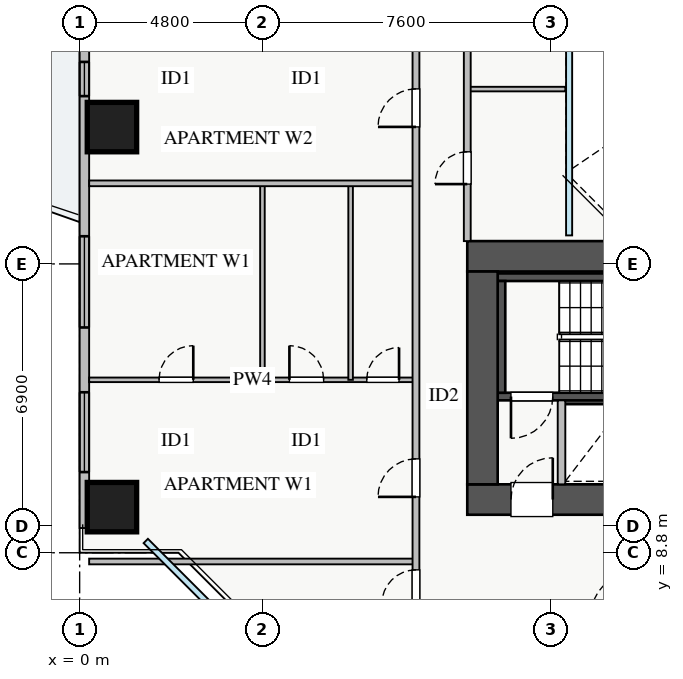
"""IFC4 building model, lengths in metres.
Left out: names, types, materials, properties, quantities, classifications, styles, units other than length and angle.
Written with IfcOpenShell. Run it as: python <this file> out.ifc"""

import sys

from ifc_helpers import new_model, si_unit, direction, frame, frame_2d, origin, origin_2d, place, context, subcontext, project, spatial, rectangle, extrude, source, transform, mapped, element, fill, save


model = new_model("IFC4")
c1 = context("Model", 3, precision=1e-05, world=origin(), true_north=direction((0.0, 1.0)))
c2 = subcontext(c1, "Body", "Model", "MODEL_VIEW")
j1 = project(units=[si_unit("LENGTHUNIT", "METRE"), si_unit("PLANEANGLEUNIT", "RADIAN")], contexts=[c1])
p1 = place(None, origin())
s1 = spatial("IfcSite", under=j1, at=p1, CompositionType="ELEMENT")
p2 = place(p1, origin())
s2 = spatial("IfcBuilding", under=s1, at=p2, CompositionType="ELEMENT")
p3 = place(p2, frame((0.0, 0.0, 36.0)))
s3 = spatial("IfcBuildingStorey", under=s2, at=p3, CompositionType="ELEMENT", Elevation=36.0)
p4 = place(p3, frame((12.68, 12.8, 0.0), z_axis=(0.0, 0.0, 1.0), x_axis=(1.0, 0.0, 0.0)))
e1 = element("IfcWall", 1, at=p4, inside=s3, PredefinedType="SHEAR", context=c2, shape_type="SweptSolid", body=[
    extrude(rectangle(XDim=1.94, YDim=0.18, at=frame_2d((0.97, 0.0))), origin(), (0.0, 0.0, 1.0), 3.07),
])
p5 = place(p3, frame((11.0, 12.91, 0.0), z_axis=(0.0, 0.0, 1.0), x_axis=(1.0, 0.0, 0.0)))
e2 = element("IfcWall", 2, at=p5, inside=s3, PredefinedType="SHEAR", context=c2, shape_type="SweptSolid", body=[
    extrude(rectangle(XDim=7.15, YDim=0.2, at=frame_2d((3.575, 0.0))), origin(), (0.0, 0.0, 1.0), 3.25),
])
p6 = place(p5, frame((0.35, 0.0, 0.0)))
e3 = element("IfcOpeningElement", 3, at=p6, cuts=e2, PredefinedType="OPENING", context=c2, shape_type="SweptSolid", body=[
    extrude(rectangle(XDim=1.1, YDim=2.05, at=frame_2d((0.55, 1.025))), frame((0.0, 0.11, 0.0), z_axis=(0.0, -1.0, 0.0), x_axis=(1.0, 0.0, 0.0)), (0.0, 0.0, 1.0), 0.22),
])
p7 = place(p3, frame((11.0, 16.05, 0.0), z_axis=(0.0, 0.0, 1.0), x_axis=(1.0, 0.0, 0.0)))
e4 = element("IfcWall", 4, at=p7, inside=s3, PredefinedType="SHEAR", context=c2, shape_type="SweptSolid", body=[
    extrude(rectangle(XDim=7.15, YDim=0.2, at=frame_2d((3.575, 0.0))), origin(), (0.0, 0.0, 1.0), 3.25),
])
p8 = place(p3, frame((11.1, 13.01, 0.0), z_axis=(0.0, 0.0, 1.0), x_axis=(0.0, 1.0, 0.0)))
e5 = element("IfcWall", 5, at=p8, inside=s3, PredefinedType="SHEAR", context=c2, shape_type="SweptSolid", body=[
    extrude(rectangle(XDim=2.94, YDim=0.2, at=frame_2d((1.47, 0.0))), origin(), (0.0, 0.0, 1.0), 3.25),
])
p9 = place(p3, frame((10.2, 10.2, 0.0), z_axis=(0.0, 0.0, 1.0), x_axis=(1.0, 0.0, 0.0)))
e6 = element("IfcWall", 6, at=p9, inside=s3, PredefinedType="SHEAR", context=c2, shape_type="SweptSolid", body=[
    extrude(rectangle(XDim=17.6, YDim=0.8, at=frame_2d((8.8, 0.0))), origin(), (0.0, 0.0, 1.0), 3.25),
])
p10 = place(p9, frame((1.15, 0.0, 0.0)))
e7 = element("IfcOpeningElement", 7, at=p10, cuts=e6, PredefinedType="OPENING", context=c2, shape_type="SweptSolid", body=[
    extrude(rectangle(XDim=1.1, YDim=2.05, at=frame_2d((0.55, 1.025))), frame((0.0, 0.41, 0.0), z_axis=(0.0, -1.0, 0.0), x_axis=(1.0, 0.0, 0.0)), (0.0, 0.0, 1.0), 0.82),
])
p11 = place(p9, frame((8.3, 0.0, 0.0)))
e8 = element("IfcOpeningElement", 8, at=p11, cuts=e6, PredefinedType="OPENING", context=c2, shape_type="SweptSolid", body=[
    extrude(rectangle(XDim=1.1, YDim=2.05, at=frame_2d((0.55, 1.025))), frame((0.0, 0.41, 0.0), z_axis=(0.0, -1.0, 0.0), x_axis=(1.0, 0.0, 0.0)), (0.0, 0.0, 1.0), 0.82),
])
p12 = place(p9, frame((10.05, 0.0, 0.0)))
e9 = element("IfcOpeningElement", 9, at=p12, cuts=e6, PredefinedType="OPENING", context=c2, shape_type="SweptSolid", body=[
    extrude(rectangle(XDim=1.1, YDim=2.05, at=frame_2d((0.55, 1.025))), frame((0.0, 0.41, 0.0), z_axis=(0.0, -1.0, 0.0), x_axis=(1.0, 0.0, 0.0)), (0.0, 0.0, 1.0), 0.82),
])
p13 = place(p9, frame((14.74, 0.0, 0.0)))
e10 = element("IfcOpeningElement", 10, at=p13, cuts=e6, PredefinedType="OPENING", context=c2, shape_type="SweptSolid", body=[
    extrude(rectangle(XDim=1.0, YDim=2.05, at=frame_2d((0.5, 1.025))), frame((0.0, 0.41, 0.0), z_axis=(0.0, -1.0, 0.0), x_axis=(1.0, 0.0, 0.0)), (0.0, 0.0, 1.0), 0.82),
])
p14 = place(p9, frame((11.945, 0.0, 0.0)))
e11 = element("IfcOpeningElement", 11, at=p14, cuts=e6, PredefinedType="OPENING", context=c2, shape_type="SweptSolid", body=[
    extrude(rectangle(XDim=1.0, YDim=2.05, at=frame_2d((0.5, 1.025))), frame((0.0, 0.41, 0.0), z_axis=(0.0, -1.0, 0.0), x_axis=(1.0, 0.0, 0.0)), (0.0, 0.0, 1.0), 0.82),
])
p15 = place(p9, frame((13.48, 0.0, 0.0)))
e12 = element("IfcOpeningElement", 12, at=p15, cuts=e6, PredefinedType="OPENING", context=c2, shape_type="SweptSolid", body=[
    extrude(rectangle(XDim=1.0, YDim=2.05, at=frame_2d((0.5, 1.025))), frame((0.0, 0.41, 0.0), z_axis=(0.0, -1.0, 0.0), x_axis=(1.0, 0.0, 0.0)), (0.0, 0.0, 1.0), 0.82),
])
p16 = place(p3, frame((10.2, 16.6, 0.0), z_axis=(0.0, 0.0, 1.0), x_axis=(1.0, 0.0, 0.0)))
e13 = element("IfcWall", 13, at=p16, inside=s3, PredefinedType="SHEAR", context=c2, shape_type="SweptSolid", body=[
    extrude(rectangle(XDim=17.6, YDim=0.8, at=frame_2d((8.8, 0.0))), origin(), (0.0, 0.0, 1.0), 3.25),
])
p17 = place(p3, frame((10.6, 10.6, 0.0), z_axis=(0.0, 0.0, 1.0), x_axis=(0.0, 1.0, 0.0)))
e14 = element("IfcWall", 14, at=p17, inside=s3, PredefinedType="SHEAR", context=c2, shape_type="SweptSolid", body=[
    extrude(rectangle(XDim=5.6, YDim=0.8, at=frame_2d((2.8, 0.0))), origin(), (0.0, 0.0, 1.0), 3.25),
])
m1 = source(origin(), c2, "Body", "SweptSolid", [
    extrude(rectangle(XDim=1.3, YDim=1.3, at=origin_2d()), origin(), (0.0, 0.0, 1.0), 3.25),
])
for number, where, z_axis, x_axis in (
    (15, (0.85, 20.0, 0.0), (0.0, 0.0, 1.0), (1.0, 0.0, 0.0)),
    (16, (0.85, 10.0, 0.0), (0.0, 0.0, 1.0), (1.0, 0.0, 0.0)),
):
    element("IfcColumn", number, at=place(p3, frame(where, z_axis=z_axis, x_axis=x_axis)), inside=s3, PredefinedType="COLUMN", context=c2, shape_type="MappedRepresentation", body=[
        mapped(m1, transform((0.0, 0.0, 0.0), x_axis=(1.0, 0.0, 0.0), y_axis=(0.0, 1.0, 0.0), z_axis=(0.0, 0.0, 1.0), scale=1.0)),
    ])
p18 = place(p3, frame((0.125, 9.45, 0.0), z_axis=(0.0, 0.0, 1.0), x_axis=(0.0, 1.0, 0.0)))
e17 = element("IfcWall", 17, at=p18, inside=s3, PredefinedType="STANDARD", context=c2, shape_type="SweptSolid", body=[
    extrude(rectangle(XDim=27.1, YDim=0.25, at=frame_2d((13.55, 0.0))), origin(), (0.0, 0.0, 1.0), 2.61),
])
p19 = place(p18, frame((14.4, 0.0, 0.0)))
e18 = element("IfcOpeningElement", 18, at=p19, cuts=e17, PredefinedType="OPENING", context=c2, shape_type="SweptSolid", body=[
    extrude(rectangle(XDim=1.2, YDim=2.1, at=frame_2d((0.6, 1.05))), frame((0.0, 0.135, 0.0), z_axis=(0.0, -1.0, 0.0), x_axis=(1.0, 0.0, 0.0)), (0.0, 0.0, 1.0), 0.27),
])
p20 = place(p18, frame((1.472, 0.0, 0.9)))
e19 = element("IfcOpeningElement", 19, at=p20, cuts=e17, PredefinedType="OPENING", context=c2, shape_type="SweptSolid", body=[
    extrude(rectangle(XDim=2.1, YDim=1.5, at=frame_2d((1.05, 0.75))), frame((0.0, 0.135, 0.0), z_axis=(0.0, -1.0, 0.0), x_axis=(1.0, 0.0, 0.0)), (0.0, 0.0, 1.0), 0.27),
])
p21 = place(p18, frame((22.663, 0.0, 0.9)))
e20 = element("IfcOpeningElement", 20, at=p21, cuts=e17, PredefinedType="OPENING", context=c2, shape_type="SweptSolid", body=[
    extrude(rectangle(XDim=2.1, YDim=1.48, at=frame_2d((1.05, 0.74))), frame((0.0, 0.135, 0.0), z_axis=(0.0, -1.0, 0.0), x_axis=(1.0, 0.0, 0.0)), (0.0, 0.0, 1.0), 0.27),
])
p22 = place(p18, frame((5.278, 0.0, 0.9)))
e21 = element("IfcOpeningElement", 21, at=p22, cuts=e17, PredefinedType="OPENING", context=c2, shape_type="SweptSolid", body=[
    extrude(rectangle(XDim=2.4, YDim=1.5, at=frame_2d((1.2, 0.75))), frame((0.0, 0.135, 0.0), z_axis=(0.0, -1.0, 0.0), x_axis=(1.0, 0.0, 0.0)), (0.0, 0.0, 1.0), 0.27),
])
p23 = place(p18, frame((11.365, 0.0, 0.9)))
e22 = element("IfcOpeningElement", 22, at=p23, cuts=e17, PredefinedType="OPENING", context=c2, shape_type="SweptSolid", body=[
    extrude(rectangle(XDim=0.9, YDim=1.2, at=frame_2d((0.45, 0.6))), frame((0.0, 0.135, 0.0), z_axis=(0.0, -1.0, 0.0), x_axis=(1.0, 0.0, 0.0)), (0.0, 0.0, 1.0), 0.27),
])
p24 = place(p3, frame((12.68, 10.6, 0.0), z_axis=(0.0, 0.0, 1.0), x_axis=(0.0, 1.0, 0.0)))
e23 = element("IfcWall", 23, at=p24, inside=s3, PredefinedType="PARTITIONING", context=c2, shape_type="SweptSolid", body=[
    extrude(rectangle(XDim=2.21, YDim=0.2, at=frame_2d((1.105, 0.0))), origin(), (0.0, 0.0, 1.0), 3.07),
])
p25 = place(p3, frame((0.25, 8.57, 0.0), z_axis=(0.0, 0.0, 1.0), x_axis=(1.0, 0.0, 0.0)))
e24 = element("IfcWall", 24, at=p25, inside=s3, PredefinedType="PARTITIONING", context=c2, shape_type="SweptSolid", body=[
    extrude(rectangle(XDim=8.6, YDim=0.15, at=frame_2d((4.3, 0.0))), origin(), (0.0, 0.0, 1.0), 3.07),
])
p26 = place(p3, frame((0.25, 13.35, 0.0), z_axis=(0.0, 0.0, 1.0), x_axis=(1.0, 0.0, 0.0)))
e25 = element("IfcWall", 25, at=p26, inside=s3, PredefinedType="PLUMBINGWALL", context=c2, shape_type="SweptSolid", body=[
    extrude(rectangle(XDim=8.6, YDim=0.12, at=frame_2d((4.3, 0.0))), origin(), (0.0, 0.0, 1.0), 3.07),
])
p27 = place(p26, frame((1.84, 0.0, 0.0)))
e26 = element("IfcOpeningElement", 26, at=p27, cuts=e25, PredefinedType="OPENING", context=c2, shape_type="SweptSolid", body=[
    extrude(rectangle(XDim=0.9, YDim=2.05, at=frame_2d((0.45, 1.025))), frame((0.0, 0.07, 0.0), z_axis=(0.0, -1.0, 0.0), x_axis=(1.0, 0.0, 0.0)), (0.0, 0.0, 1.0), 0.14),
])
p28 = place(p26, frame((5.27, 0.0, 0.0)))
e27 = element("IfcOpeningElement", 27, at=p28, cuts=e25, PredefinedType="OPENING", context=c2, shape_type="SweptSolid", body=[
    extrude(rectangle(XDim=0.9, YDim=2.05, at=frame_2d((0.45, 1.025))), frame((0.0, 0.07, 0.0), z_axis=(0.0, -1.0, 0.0), x_axis=(1.0, 0.0, 0.0)), (0.0, 0.0, 1.0), 0.14),
])
p29 = place(p26, frame((7.305, 0.0, 0.0)))
e28 = element("IfcOpeningElement", 28, at=p29, cuts=e25, PredefinedType="OPENING", context=c2, shape_type="SweptSolid", body=[
    extrude(rectangle(XDim=0.85, YDim=2.05, at=frame_2d((0.425, 1.025))), frame((0.0, 0.07, 0.0), z_axis=(0.0, -1.0, 0.0), x_axis=(1.0, 0.0, 0.0)), (0.0, 0.0, 1.0), 0.14),
])
for number, where, z_axis, x_axis in (
    (29, (4.81, 13.35, 0.0), (0.0, 0.0, 1.0), (0.0, 1.0, 0.0)),
    (30, (7.13, 13.35, 0.0), (0.0, 0.0, 1.0), (0.0, 1.0, 0.0)),
):
    element("IfcWall", number, at=place(p3, frame(where, z_axis=z_axis, x_axis=x_axis)), inside=s3, PredefinedType="PLUMBINGWALL", context=c2, shape_type="SweptSolid", body=[
        extrude(rectangle(XDim=5.17, YDim=0.12, at=frame_2d((2.585, 0.0))), origin(), (0.0, 0.0, 1.0), 3.07),
    ])
p30 = place(p3, frame((0.25, 18.52, 0.0), z_axis=(0.0, 0.0, 1.0), x_axis=(1.0, 0.0, 0.0)))
e31 = element("IfcWall", 31, at=p30, inside=s3, PredefinedType="PARTITIONING", context=c2, shape_type="SweptSolid", body=[
    extrude(rectangle(XDim=8.6, YDim=0.15, at=frame_2d((4.3, 0.0))), origin(), (0.0, 0.0, 1.0), 3.07),
])
p31 = place(p3, frame((8.85, 7.21, 0.0), z_axis=(0.0, 0.0, 1.0), x_axis=(0.0, 1.0, 0.0)))
e32 = element("IfcWall", 32, at=p31, inside=s3, PredefinedType="PARTITIONING", context=c2, shape_type="SweptSolid", body=[
    extrude(rectangle(XDim=31.23, YDim=0.18, at=frame_2d((15.615, 0.0))), origin(), (0.0, 0.0, 1.0), 3.07),
])
p32 = place(p31, frame((30.09, 0.0, 0.0)))
e33 = element("IfcOpeningElement", 33, at=p32, cuts=e32, PredefinedType="OPENING", context=c2, shape_type="SweptSolid", body=[
    extrude(rectangle(XDim=0.9, YDim=2.05, at=frame_2d((0.45, 1.025))), frame((0.0, 0.1, 0.0), z_axis=(0.0, -1.0, 0.0), x_axis=(1.0, 0.0, 0.0)), (0.0, 0.0, 1.0), 0.2),
])
p33 = place(p31, frame((0.24, 0.0, 0.0)))
e34 = element("IfcOpeningElement", 34, at=p33, cuts=e32, PredefinedType="OPENING", context=c2, shape_type="SweptSolid", body=[
    extrude(rectangle(XDim=0.9, YDim=2.05, at=frame_2d((0.45, 1.025))), frame((0.0, 0.1, 0.0), z_axis=(0.0, -1.0, 0.0), x_axis=(1.0, 0.0, 0.0)), (0.0, 0.0, 1.0), 0.2),
])
p34 = place(p31, frame((3.06, 0.0, 0.0)))
e35 = element("IfcOpeningElement", 35, at=p34, cuts=e32, PredefinedType="OPENING", context=c2, shape_type="SweptSolid", body=[
    extrude(rectangle(XDim=1.0, YDim=2.05, at=frame_2d((0.5, 1.025))), frame((0.0, 0.1, 0.0), z_axis=(0.0, -1.0, 0.0), x_axis=(1.0, 0.0, 0.0)), (0.0, 0.0, 1.0), 0.2),
])
p35 = place(p31, frame((12.795, 0.0, 0.0)))
e36 = element("IfcOpeningElement", 36, at=p35, cuts=e32, PredefinedType="OPENING", context=c2, shape_type="SweptSolid", body=[
    extrude(rectangle(XDim=1.0, YDim=2.05, at=frame_2d((0.5, 1.025))), frame((0.0, 0.1, 0.0), z_axis=(0.0, -1.0, 0.0), x_axis=(1.0, 0.0, 0.0)), (0.0, 0.0, 1.0), 0.2),
])
p36 = place(p31, frame((24.62, 0.0, 0.0)))
e37 = element("IfcOpeningElement", 37, at=p36, cuts=e32, PredefinedType="OPENING", context=c2, shape_type="SweptSolid", body=[
    extrude(rectangle(XDim=1.0, YDim=2.05, at=frame_2d((0.5, 1.025))), frame((0.0, 0.1, 0.0), z_axis=(0.0, -1.0, 0.0), x_axis=(1.0, 0.0, 0.0)), (0.0, 0.0, 1.0), 0.2),
])
p37 = place(p3, frame((10.2, 21.0, 0.0), z_axis=(0.0, 0.0, 1.0), x_axis=(1.0, 0.0, 0.0)))
e38 = element("IfcWall", 38, at=p37, inside=s3, PredefinedType="PLUMBINGWALL", context=c2, shape_type="SweptSolid", body=[
    extrude(rectangle(XDim=2.58, YDim=0.12, at=frame_2d((1.29, 0.0))), origin(), (0.0, 0.0, 1.0), 3.07),
])
p38 = place(p3, frame((10.2, 17.0, 0.0), z_axis=(0.0, 0.0, 1.0), x_axis=(0.0, 1.0, 0.0)))
e39 = element("IfcWall", 39, at=p38, inside=s3, PredefinedType="PARTITIONING", context=c2, shape_type="SweptSolid", body=[
    extrude(rectangle(XDim=12.0, YDim=0.18, at=frame_2d((6.0, 0.0))), origin(), (0.0, 0.0, 1.0), 3.07),
])
p39 = place(p38, frame((1.5, 0.0, 0.0)))
e40 = element("IfcOpeningElement", 40, at=p39, cuts=e39, PredefinedType="OPENING", context=c2, shape_type="SweptSolid", body=[
    extrude(rectangle(XDim=0.85, YDim=2.05, at=frame_2d((0.425, 1.025))), frame((0.0, 0.1, 0.0), z_axis=(0.0, -1.0, 0.0), x_axis=(1.0, 0.0, 0.0)), (0.0, 0.0, 1.0), 0.2),
])
p40 = place(p38, frame((6.5, 0.0, 0.0)))
e41 = element("IfcOpeningElement", 41, at=p40, cuts=e39, PredefinedType="OPENING", context=c2, shape_type="SweptSolid", body=[
    extrude(rectangle(XDim=1.0, YDim=2.05, at=frame_2d((0.5, 1.025))), frame((0.0, 0.1, 0.0), z_axis=(0.0, -1.0, 0.0), x_axis=(1.0, 0.0, 0.0)), (0.0, 0.0, 1.0), 0.2),
])
m2 = source(origin(), c2, "Body", "SweptSolid", [
    extrude(rectangle(XDim=2.1, YDim=1.5, at=frame_2d((1.05, 0.75))), frame((0.0, 0.03, 0.0), z_axis=(0.0, -1.0, 0.0), x_axis=(1.0, 0.0, 0.0)), (0.0, 0.0, 1.0), 0.06),
])
p41 = place(p20, origin())
e42 = element("IfcWindow", 42, at=p41, inside=s3, PartitioningType="TRIPLE_PANEL_VERTICAL", PredefinedType="WINDOW", context=c2, shape_type="MappedRepresentation", body=[
    mapped(m2, transform((0.0, 0.0, 0.0), x_axis=(1.0, 0.0, 0.0), y_axis=(0.0, 1.0, 0.0), z_axis=(0.0, 0.0, 1.0), scale=1.0)),
])
fill(e19, e42)
m3 = source(origin(), c2, "Body", "SweptSolid", [
    extrude(rectangle(XDim=1.1, YDim=2.05, at=frame_2d((0.55, 1.025))), frame((0.0, 0.025, 0.0), z_axis=(0.0, -1.0, 0.0), x_axis=(1.0, 0.0, 0.0)), (0.0, 0.0, 1.0), 0.05),
])
p42 = place(p10, origin())
e43 = element("IfcDoor", 43, at=p42, inside=s3, OperationType="SINGLE_SWING_RIGHT", PredefinedType="DOOR", context=c2, shape_type="MappedRepresentation", body=[
    mapped(m3, transform((0.0, 0.0, 0.0), x_axis=(1.0, 0.0, 0.0), y_axis=(0.0, 1.0, 0.0), z_axis=(0.0, 0.0, 1.0), scale=1.0)),
])
fill(e7, e43)
p43 = place(p6, frame((1.1, 0.0, 0.0), z_axis=(0.0, 0.0, 1.0), x_axis=(-1.0, 0.0, 0.0)))
e44 = element("IfcDoor", 44, at=p43, inside=s3, OperationType="SINGLE_SWING_LEFT", PredefinedType="DOOR", context=c2, shape_type="MappedRepresentation", body=[
    mapped(m3, transform((0.0, 0.0, 0.0), x_axis=(1.0, 0.0, 0.0), y_axis=(0.0, 1.0, 0.0), z_axis=(0.0, 0.0, 1.0), scale=1.0)),
])
fill(e3, e44)
m4 = source(origin(), c2, "Body", "SweptSolid", [
    extrude(rectangle(XDim=0.9, YDim=2.05, at=frame_2d((0.45, 1.025))), frame((0.0, 0.025, 0.0), z_axis=(0.0, -1.0, 0.0), x_axis=(1.0, 0.0, 0.0)), (0.0, 0.0, 1.0), 0.05),
])
p44 = place(p27, origin())
e45 = element("IfcDoor", 45, at=p44, inside=s3, OperationType="SINGLE_SWING_RIGHT", PredefinedType="DOOR", context=c2, shape_type="MappedRepresentation", body=[
    mapped(m4, transform((0.0, 0.0, 0.0), x_axis=(1.0, 0.0, 0.0), y_axis=(0.0, 1.0, 0.0), z_axis=(0.0, 0.0, 1.0), scale=1.0)),
])
fill(e26, e45)
p45 = place(p28, origin())
e46 = element("IfcDoor", 46, at=p45, inside=s3, OperationType="SINGLE_SWING_LEFT", PredefinedType="DOOR", context=c2, shape_type="MappedRepresentation", body=[
    mapped(m4, transform((0.0, 0.0, 0.0), x_axis=(1.0, 0.0, 0.0), y_axis=(0.0, 1.0, 0.0), z_axis=(0.0, 0.0, 1.0), scale=1.0)),
])
fill(e27, e46)
m5 = source(origin(), c2, "Body", "SweptSolid", [
    extrude(rectangle(XDim=0.85, YDim=2.05, at=frame_2d((0.425, 1.025))), frame((0.0, 0.025, 0.0), z_axis=(0.0, -1.0, 0.0), x_axis=(1.0, 0.0, 0.0)), (0.0, 0.0, 1.0), 0.05),
])
p46 = place(p29, origin())
e47 = element("IfcDoor", 47, at=p46, inside=s3, OperationType="SINGLE_SWING_RIGHT", PredefinedType="DOOR", context=c2, shape_type="MappedRepresentation", body=[
    mapped(m5, transform((0.0, 0.0, 0.0), x_axis=(1.0, 0.0, 0.0), y_axis=(0.0, 1.0, 0.0), z_axis=(0.0, 0.0, 1.0), scale=1.0)),
])
fill(e28, e47)
p47 = place(p33, origin())
e48 = element("IfcDoor", 48, at=p47, inside=s3, OperationType="SINGLE_SWING_LEFT", PredefinedType="DOOR", context=c2, shape_type="MappedRepresentation", body=[
    mapped(m4, transform((0.0, 0.0, 0.0), x_axis=(1.0, 0.0, 0.0), y_axis=(0.0, 1.0, 0.0), z_axis=(0.0, 0.0, 1.0), scale=1.0)),
])
fill(e34, e48)
m6 = source(origin(), c2, "Body", "SweptSolid", [
    extrude(rectangle(XDim=1.0, YDim=2.05, at=frame_2d((0.5, 1.025))), frame((0.0, 0.025, 0.0), z_axis=(0.0, -1.0, 0.0), x_axis=(1.0, 0.0, 0.0)), (0.0, 0.0, 1.0), 0.05),
])
p48 = place(p34, origin())
e49 = element("IfcDoor", 49, at=p48, inside=s3, OperationType="SINGLE_SWING_LEFT", PredefinedType="DOOR", context=c2, shape_type="MappedRepresentation", body=[
    mapped(m6, transform((0.0, 0.0, 0.0), x_axis=(1.0, 0.0, 0.0), y_axis=(0.0, 1.0, 0.0), z_axis=(0.0, 0.0, 1.0), scale=1.0)),
])
fill(e35, e49)
p49 = place(p35, origin())
e50 = element("IfcDoor", 50, at=p49, inside=s3, OperationType="SINGLE_SWING_LEFT", PredefinedType="DOOR", context=c2, shape_type="MappedRepresentation", body=[
    mapped(m6, transform((0.0, 0.0, 0.0), x_axis=(1.0, 0.0, 0.0), y_axis=(0.0, 1.0, 0.0), z_axis=(0.0, 0.0, 1.0), scale=1.0)),
])
fill(e36, e50)
p50 = place(p39, origin())
e51 = element("IfcDoor", 51, at=p50, inside=s3, OperationType="SINGLE_SWING_LEFT", PredefinedType="DOOR", context=c2, shape_type="MappedRepresentation", body=[
    mapped(m5, transform((0.0, 0.0, 0.0), x_axis=(1.0, 0.0, 0.0), y_axis=(0.0, 1.0, 0.0), z_axis=(0.0, 0.0, 1.0), scale=1.0)),
])
fill(e40, e51)
m7 = source(origin(), c2, "Body", "SweptSolid", [
    extrude(rectangle(XDim=2.4, YDim=1.5, at=frame_2d((1.2, 0.75))), frame((0.0, 0.03, 0.0), z_axis=(0.0, -1.0, 0.0), x_axis=(1.0, 0.0, 0.0)), (0.0, 0.0, 1.0), 0.06),
])
p51 = place(p22, origin())
e52 = element("IfcWindow", 52, at=p51, inside=s3, PartitioningType="TRIPLE_PANEL_VERTICAL", PredefinedType="WINDOW", context=c2, shape_type="MappedRepresentation", body=[
    mapped(m7, transform((0.0, 0.0, 0.0), x_axis=(1.0, 0.0, 0.0), y_axis=(0.0, 1.0, 0.0), z_axis=(0.0, 0.0, 1.0), scale=1.0)),
])
fill(e21, e52)
m8 = source(origin(), c2, "Body", "SweptSolid", [
    extrude(rectangle(XDim=0.9, YDim=1.2, at=frame_2d((0.45, 0.6))), frame((0.0, 0.03, 0.0), z_axis=(0.0, -1.0, 0.0), x_axis=(1.0, 0.0, 0.0)), (0.0, 0.0, 1.0), 0.06),
])
p52 = place(p23, origin())
e53 = element("IfcWindow", 53, at=p52, inside=s3, PartitioningType="SINGLE_PANEL", PredefinedType="WINDOW", context=c2, shape_type="MappedRepresentation", body=[
    mapped(m8, transform((0.0, 0.0, 0.0), x_axis=(1.0, 0.0, 0.0), y_axis=(0.0, 1.0, 0.0), z_axis=(0.0, 0.0, 1.0), scale=1.0)),
])
fill(e22, e53)
save(model, sys.argv[1])
